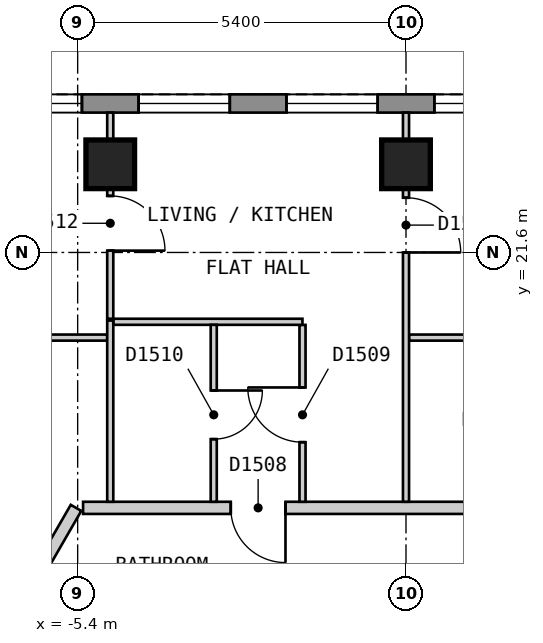
"""IFC4 building model, lengths in metres.
Left out: names, types, materials, properties, quantities, classifications, styles, units other than length and angle.
Written with IfcOpenShell. Run it as: python <this file> out.ifc"""

import sys

from ifc_helpers import new_model, si_unit, direction, frame, frame_2d, origin, origin_2d, place, context, subcontext, project, spatial, polyline, rectangle, outline, extrude, element, fill, save


model = new_model("IFC4")
c1 = context("Model", 3, precision=1e-05, world=origin(), true_north=direction((0.0, 1.0)))
c2 = subcontext(c1, "Body", "Model", "MODEL_VIEW")
j1 = project(units=[si_unit("LENGTHUNIT", "METRE"), si_unit("PLANEANGLEUNIT", "RADIAN")], contexts=[c1])
p1 = place(None, origin())
s1 = spatial("IfcSite", under=j1, at=p1, CompositionType="ELEMENT")
p2 = place(p1, origin())
s2 = spatial("IfcBuilding", under=s1, at=p2, CompositionType="ELEMENT")
p3 = place(p2, frame((0.0, 0.0, 184.2)))
s3 = spatial("IfcBuildingStorey", under=s2, at=p3, CompositionType="ELEMENT", Elevation=184.2)
for number, where, z_axis, x_axis in (
    (1, (0.0, 23.05, 0.0), (0.0, 0.0, 1.0), (-1.0, 0.0, 0.0)),
    (2, (-4.864, 23.05, 0.0), (0.0, 0.0, 1.0), (-1.0, 0.0, 0.0)),
):
    element("IfcColumn", number, at=place(p3, frame(where, z_axis=z_axis, x_axis=x_axis)), inside=s3, PredefinedType="COLUMN", context=c2, shape_type="SweptSolid", body=[
        extrude(rectangle(XDim=0.8, YDim=0.8, at=origin_2d()), origin(), (0.0, 0.0, 1.0), 3.0),
    ])
p4 = place(p3, frame((10.392, 24.05, 0.0), z_axis=(0.0, 0.0, 1.0), x_axis=(-1.0, 0.0, 0.0)))
e3 = element("IfcWall", 3, at=p4, inside=s3, PredefinedType="SOLIDWALL", context=c2, shape_type="SweptSolid", body=[
    extrude(outline(polyline([(0.0, -0.15), (20.784, -0.15), (20.704, 0.15), (0.08, 0.15), (0.0, -0.15)])), origin(), (0.0, 0.0, 1.0), 2.7),
])
p5 = place(p4, frame((1.13, 0.0, 0.15)))
e4 = element("IfcOpeningElement", 4, at=p5, cuts=e3, PredefinedType="OPENING", context=c2, shape_type="SweptSolid", body=[
    extrude(rectangle(XDim=1.5, YDim=2.1, at=frame_2d((0.75, 1.05))), frame((0.0, 0.16, 0.0), z_axis=(0.0, -1.0, 0.0), x_axis=(1.0, 0.0, 0.0)), (0.0, 0.0, 1.0), 0.32),
])
p6 = place(p4, frame((3.562, 0.0, 0.15)))
e5 = element("IfcOpeningElement", 5, at=p6, cuts=e3, PredefinedType="OPENING", context=c2, shape_type="SweptSolid", body=[
    extrude(rectangle(XDim=1.5, YDim=2.1, at=frame_2d((0.75, 1.05))), frame((0.0, 0.16, 0.0), z_axis=(0.0, -1.0, 0.0), x_axis=(1.0, 0.0, 0.0)), (0.0, 0.0, 1.0), 0.32),
])
p7 = place(p4, frame((5.994, 0.0, 0.15)))
e6 = element("IfcOpeningElement", 6, at=p7, cuts=e3, PredefinedType="OPENING", context=c2, shape_type="SweptSolid", body=[
    extrude(rectangle(XDim=1.5, YDim=2.1, at=frame_2d((0.75, 1.05))), frame((0.0, 0.16, 0.0), z_axis=(0.0, -1.0, 0.0), x_axis=(1.0, 0.0, 0.0)), (0.0, 0.0, 1.0), 0.32),
])
p8 = place(p4, frame((8.426, 0.0, 0.15)))
e7 = element("IfcOpeningElement", 7, at=p8, cuts=e3, PredefinedType="OPENING", context=c2, shape_type="SweptSolid", body=[
    extrude(rectangle(XDim=1.5, YDim=2.1, at=frame_2d((0.75, 1.05))), frame((0.0, 0.16, 0.0), z_axis=(0.0, -1.0, 0.0), x_axis=(1.0, 0.0, 0.0)), (0.0, 0.0, 1.0), 0.32),
])
p9 = place(p4, frame((10.858, 0.0, 0.15)))
e8 = element("IfcOpeningElement", 8, at=p9, cuts=e3, PredefinedType="OPENING", context=c2, shape_type="SweptSolid", body=[
    extrude(rectangle(XDim=1.5, YDim=2.1, at=frame_2d((0.75, 1.05))), frame((0.0, 0.16, 0.0), z_axis=(0.0, -1.0, 0.0), x_axis=(1.0, 0.0, 0.0)), (0.0, 0.0, 1.0), 0.32),
])
p10 = place(p4, frame((13.29, 0.0, 0.15)))
e9 = element("IfcOpeningElement", 9, at=p10, cuts=e3, PredefinedType="OPENING", context=c2, shape_type="SweptSolid", body=[
    extrude(rectangle(XDim=1.5, YDim=2.1, at=frame_2d((0.75, 1.05))), frame((0.0, 0.16, 0.0), z_axis=(0.0, -1.0, 0.0), x_axis=(1.0, 0.0, 0.0)), (0.0, 0.0, 1.0), 0.32),
])
p11 = place(p4, frame((15.722, 0.0, 0.15)))
e10 = element("IfcOpeningElement", 10, at=p11, cuts=e3, PredefinedType="OPENING", context=c2, shape_type="SweptSolid", body=[
    extrude(rectangle(XDim=1.5, YDim=2.1, at=frame_2d((0.75, 1.05))), frame((0.0, 0.16, 0.0), z_axis=(0.0, -1.0, 0.0), x_axis=(1.0, 0.0, 0.0)), (0.0, 0.0, 1.0), 0.32),
])
p12 = place(p4, frame((18.154, 0.0, 0.15)))
e11 = element("IfcOpeningElement", 11, at=p12, cuts=e3, PredefinedType="OPENING", context=c2, shape_type="SweptSolid", body=[
    extrude(rectangle(XDim=1.5, YDim=2.1, at=frame_2d((0.75, 1.05))), frame((0.0, 0.16, 0.0), z_axis=(0.0, -1.0, 0.0), x_axis=(1.0, 0.0, 0.0)), (0.0, 0.0, 1.0), 0.32),
])
p13 = place(p3, frame((-5.311, 17.4, 0.0), z_axis=(0.0, 0.0, 1.0), x_axis=(1.0, 0.0, 0.0)))
e12 = element("IfcWall", 12, at=p13, inside=s3, PredefinedType="PARTITIONING", context=c2, shape_type="SweptSolid", body=[
    extrude(rectangle(XDim=10.737, YDim=0.2, at=frame_2d((5.369, 0.0))), origin(), (0.0, 0.0, 1.0), 2.7),
])
p14 = place(p13, frame((2.429, 0.0, 0.0)))
e13 = element("IfcOpeningElement", 13, at=p14, cuts=e12, PredefinedType="OPENING", context=c2, shape_type="SweptSolid", body=[
    extrude(rectangle(XDim=0.9, YDim=2.1, at=frame_2d((0.45, 1.05))), frame((0.0, 0.11, 0.0), z_axis=(0.0, -1.0, 0.0), x_axis=(1.0, 0.0, 0.0)), (0.0, 0.0, 1.0), 0.22),
])
p15 = place(p3, frame((-10.854, 8.0, 0.0), z_axis=(0.0, 0.0, 1.0), x_axis=(0.499997637144, 0.866026767976, 0.0)))
e14 = element("IfcWall", 14, at=p15, inside=s3, PredefinedType="PARTITIONING", context=c2, shape_type="SweptSolid", body=[
    extrude(rectangle(XDim=10.854, YDim=0.2, at=frame_2d((5.427, 0.0))), origin(), (0.0, 0.0, 1.0), 2.7),
])
p16 = place(p15, frame((0.721, 0.0, 0.0)))
e15 = element("IfcOpeningElement", 15, at=p16, cuts=e14, PredefinedType="OPENING", context=c2, shape_type="SweptSolid", body=[
    extrude(rectangle(XDim=1.0, YDim=2.1, at=frame_2d((0.5, 1.05))), frame((0.0, 0.11, 0.0), z_axis=(0.0, -1.0, 0.0), x_axis=(1.0, 0.0, 0.0)), (0.0, 0.0, 1.0), 0.22),
])
p17 = place(p3, frame((-4.864, 23.9, 0.0), z_axis=(0.0, 0.0, 1.0), x_axis=(0.0, -1.0, 0.0)))
e16 = element("IfcWall", 16, at=p17, inside=s3, PredefinedType="PARTITIONING", context=c2, shape_type="SweptSolid", body=[
    extrude(rectangle(XDim=3.39, YDim=0.1, at=frame_2d((1.695, 0.0))), origin(), (0.0, 0.0, 1.0), 2.7),
])
p18 = place(p17, frame((1.37, 0.0, 0.0)))
e17 = element("IfcOpeningElement", 17, at=p18, cuts=e16, PredefinedType="OPENING", context=c2, shape_type="SweptSolid", body=[
    extrude(rectangle(XDim=0.9, YDim=2.1, at=frame_2d((0.45, 1.05))), frame((0.0, 0.06, 0.0), z_axis=(0.0, -1.0, 0.0), x_axis=(1.0, 0.0, 0.0)), (0.0, 0.0, 1.0), 0.12),
])
p19 = place(p3, frame((-1.702, 20.409, 0.0), z_axis=(0.0, 0.0, 1.0), x_axis=(0.0, -1.0, 0.0)))
e18 = element("IfcWall", 18, at=p19, inside=s3, PredefinedType="PARTITIONING", context=c2, shape_type="SweptSolid", body=[
    extrude(rectangle(XDim=2.909, YDim=0.1, at=frame_2d((1.455, 0.0))), origin(), (0.0, 0.0, 1.0), 2.7),
])
p20 = place(p19, frame((1.029, 0.0, 0.0)))
e19 = element("IfcOpeningElement", 19, at=p20, cuts=e18, PredefinedType="OPENING", context=c2, shape_type="SweptSolid", body=[
    extrude(rectangle(XDim=0.9, YDim=2.1, at=frame_2d((0.45, 1.05))), frame((0.0, 0.06, 0.0), z_axis=(0.0, -1.0, 0.0), x_axis=(1.0, 0.0, 0.0)), (0.0, 0.0, 1.0), 0.12),
])
p21 = place(p3, frame((-6.985, 20.2, 0.0), z_axis=(0.0, 0.0, 1.0), x_axis=(1.0, 0.0, 0.0)))
e20 = element("IfcWall", 20, at=p21, inside=s3, PredefinedType="PARTITIONING", context=c2, shape_type="SweptSolid", body=[
    extrude(rectangle(XDim=2.071, YDim=0.1, at=frame_2d((1.036, 0.0))), origin(), (0.0, 0.0, 1.0), 2.7),
])
p22 = place(p3, frame((0.05, 20.2, 0.0), z_axis=(0.0, 0.0, 1.0), x_axis=(1.0, 0.0, 0.0)))
e21 = element("IfcWall", 21, at=p22, inside=s3, PredefinedType="PARTITIONING", context=c2, shape_type="SweptSolid", body=[
    extrude(rectangle(XDim=6.993, YDim=0.1, at=frame_2d((3.497, 0.0))), origin(), (0.0, 0.0, 1.0), 2.7),
])
p23 = place(p22, frame((1.982, 0.0, 0.0)))
e22 = element("IfcOpeningElement", 22, at=p23, cuts=e21, PredefinedType="OPENING", context=c2, shape_type="SweptSolid", body=[
    extrude(rectangle(XDim=0.8, YDim=2.1, at=frame_2d((0.4, 1.05))), frame((0.0, 0.06, 0.0), z_axis=(0.0, -1.0, 0.0), x_axis=(1.0, 0.0, 0.0)), (0.0, 0.0, 1.0), 0.12),
])
p24 = place(p3, frame((-4.814, 20.46, 0.0), z_axis=(0.0, 0.0, 1.0), x_axis=(1.0, 0.0, 0.0)))
e23 = element("IfcWall", 23, at=p24, inside=s3, PredefinedType="PARTITIONING", context=c2, shape_type="SweptSolid", body=[
    extrude(rectangle(XDim=3.111, YDim=0.1, at=frame_2d((1.556, 0.0))), origin(), (0.0, 0.0, 1.0), 2.7),
])
p25 = place(p3, frame((0.0, 17.5, 0.0), z_axis=(0.0, 0.0, 1.0), x_axis=(0.0, 1.0, 0.0)))
e24 = element("IfcWall", 24, at=p25, inside=s3, PredefinedType="PARTITIONING", context=c2, shape_type="SweptSolid", body=[
    extrude(rectangle(XDim=6.4, YDim=0.1, at=frame_2d((3.2, 0.0))), origin(), (0.0, 0.0, 1.0), 2.7),
])
p26 = place(p25, frame((4.1, 0.0, 0.0)))
e25 = element("IfcOpeningElement", 25, at=p26, cuts=e24, PredefinedType="OPENING", context=c2, shape_type="SweptSolid", body=[
    extrude(rectangle(XDim=0.9, YDim=2.1, at=frame_2d((0.45, 1.05))), frame((0.0, 0.06, 0.0), z_axis=(0.0, -1.0, 0.0), x_axis=(1.0, 0.0, 0.0)), (0.0, 0.0, 1.0), 0.12),
])
p27 = place(p3, frame((-3.162, 17.5, 0.0), z_axis=(0.0, 0.0, 1.0), x_axis=(0.0, 1.0, 0.0)))
e26 = element("IfcWall", 26, at=p27, inside=s3, PredefinedType="PARTITIONING", context=c2, shape_type="SweptSolid", body=[
    extrude(rectangle(XDim=2.91, YDim=0.1, at=frame_2d((1.455, 0.0))), origin(), (0.0, 0.0, 1.0), 2.7),
])
p28 = place(p27, frame((1.03, 0.0, 0.0)))
e27 = element("IfcOpeningElement", 27, at=p28, cuts=e26, PredefinedType="OPENING", context=c2, shape_type="SweptSolid", body=[
    extrude(rectangle(XDim=0.8, YDim=2.1, at=frame_2d((0.4, 1.05))), frame((0.0, 0.06, 0.0), z_axis=(0.0, -1.0, 0.0), x_axis=(1.0, 0.0, 0.0)), (0.0, 0.0, 1.0), 0.12),
])
p29 = place(p3, frame((-4.864, 17.5, 0.0), z_axis=(0.0, 0.0, 1.0), x_axis=(0.0, 1.0, 0.0)))
e28 = element("IfcWall", 28, at=p29, inside=s3, PredefinedType="PARTITIONING", context=c2, shape_type="SweptSolid", body=[
    extrude(rectangle(XDim=2.98, YDim=0.1, at=frame_2d((1.49, 0.0))), origin(), (0.0, 0.0, 1.0), 2.7),
])
p30 = place(p8, origin())
e29 = element("IfcWindow", 29, at=p30, inside=s3, PartitioningType="SINGLE_PANEL", PredefinedType="WINDOW", context=c2, shape_type="SweptSolid", body=[
    extrude(rectangle(XDim=1.5, YDim=2.1, at=frame_2d((0.75, 1.05))), frame((0.0, 0.03, 0.0), z_axis=(0.0, -1.0, 0.0), x_axis=(1.0, 0.0, 0.0)), (0.0, 0.0, 1.0), 0.06),
])
fill(e7, e29)
p31 = place(p9, origin())
e30 = element("IfcWindow", 30, at=p31, inside=s3, PartitioningType="SINGLE_PANEL", PredefinedType="WINDOW", context=c2, shape_type="SweptSolid", body=[
    extrude(rectangle(XDim=1.5, YDim=2.1, at=frame_2d((0.75, 1.05))), frame((0.0, 0.03, 0.0), z_axis=(0.0, -1.0, 0.0), x_axis=(1.0, 0.0, 0.0)), (0.0, 0.0, 1.0), 0.06),
])
fill(e8, e30)
p32 = place(p10, origin())
e31 = element("IfcWindow", 31, at=p32, inside=s3, PartitioningType="SINGLE_PANEL", PredefinedType="WINDOW", context=c2, shape_type="SweptSolid", body=[
    extrude(rectangle(XDim=1.5, YDim=2.1, at=frame_2d((0.75, 1.05))), frame((0.0, 0.03, 0.0), z_axis=(0.0, -1.0, 0.0), x_axis=(1.0, 0.0, 0.0)), (0.0, 0.0, 1.0), 0.06),
])
fill(e9, e31)
p33 = place(p11, origin())
e32 = element("IfcWindow", 32, at=p33, inside=s3, PartitioningType="SINGLE_PANEL", PredefinedType="WINDOW", context=c2, shape_type="SweptSolid", body=[
    extrude(rectangle(XDim=1.5, YDim=2.1, at=frame_2d((0.75, 1.05))), frame((0.0, 0.03, 0.0), z_axis=(0.0, -1.0, 0.0), x_axis=(1.0, 0.0, 0.0)), (0.0, 0.0, 1.0), 0.06),
])
fill(e10, e32)
p34 = place(p14, origin())
e33 = element("IfcDoor", 33, at=p34, inside=s3, OperationType="SINGLE_SWING_RIGHT", PredefinedType="DOOR", context=c2, shape_type="SweptSolid", body=[
    extrude(rectangle(XDim=0.9, YDim=2.1, at=frame_2d((0.45, 1.05))), frame((0.0, 0.025, 0.0), z_axis=(0.0, -1.0, 0.0), x_axis=(1.0, 0.0, 0.0)), (0.0, 0.0, 1.0), 0.05),
])
fill(e13, e33)
p35 = place(p20, origin())
e34 = element("IfcDoor", 34, at=p35, inside=s3, OperationType="SINGLE_SWING_LEFT", PredefinedType="DOOR", context=c2, shape_type="SweptSolid", body=[
    extrude(rectangle(XDim=0.9, YDim=2.1, at=frame_2d((0.45, 1.05))), frame((0.0, 0.025, 0.0), z_axis=(0.0, -1.0, 0.0), x_axis=(1.0, 0.0, 0.0)), (0.0, 0.0, 1.0), 0.05),
])
fill(e19, e34)
p36 = place(p28, origin())
e35 = element("IfcDoor", 35, at=p36, inside=s3, OperationType="SINGLE_SWING_RIGHT", PredefinedType="DOOR", context=c2, shape_type="SweptSolid", body=[
    extrude(rectangle(XDim=0.8, YDim=2.1, at=frame_2d((0.4, 1.05))), frame((0.0, 0.025, 0.0), z_axis=(0.0, -1.0, 0.0), x_axis=(1.0, 0.0, 0.0)), (0.0, 0.0, 1.0), 0.05),
])
fill(e27, e35)
p37 = place(p26, origin())
e36 = element("IfcDoor", 36, at=p37, inside=s3, OperationType="SINGLE_SWING_LEFT", PredefinedType="DOOR", context=c2, shape_type="SweptSolid", body=[
    extrude(rectangle(XDim=0.9, YDim=2.1, at=frame_2d((0.45, 1.05))), frame((0.0, 0.025, 0.0), z_axis=(0.0, -1.0, 0.0), x_axis=(1.0, 0.0, 0.0)), (0.0, 0.0, 1.0), 0.05),
])
fill(e25, e36)
p38 = place(p18, origin())
e37 = element("IfcDoor", 37, at=p38, inside=s3, OperationType="SINGLE_SWING_RIGHT", PredefinedType="DOOR", context=c2, shape_type="SweptSolid", body=[
    extrude(rectangle(XDim=0.9, YDim=2.1, at=frame_2d((0.45, 1.05))), frame((0.0, 0.025, 0.0), z_axis=(0.0, -1.0, 0.0), x_axis=(1.0, 0.0, 0.0)), (0.0, 0.0, 1.0), 0.05),
])
fill(e17, e37)
save(model, sys.argv[1])
